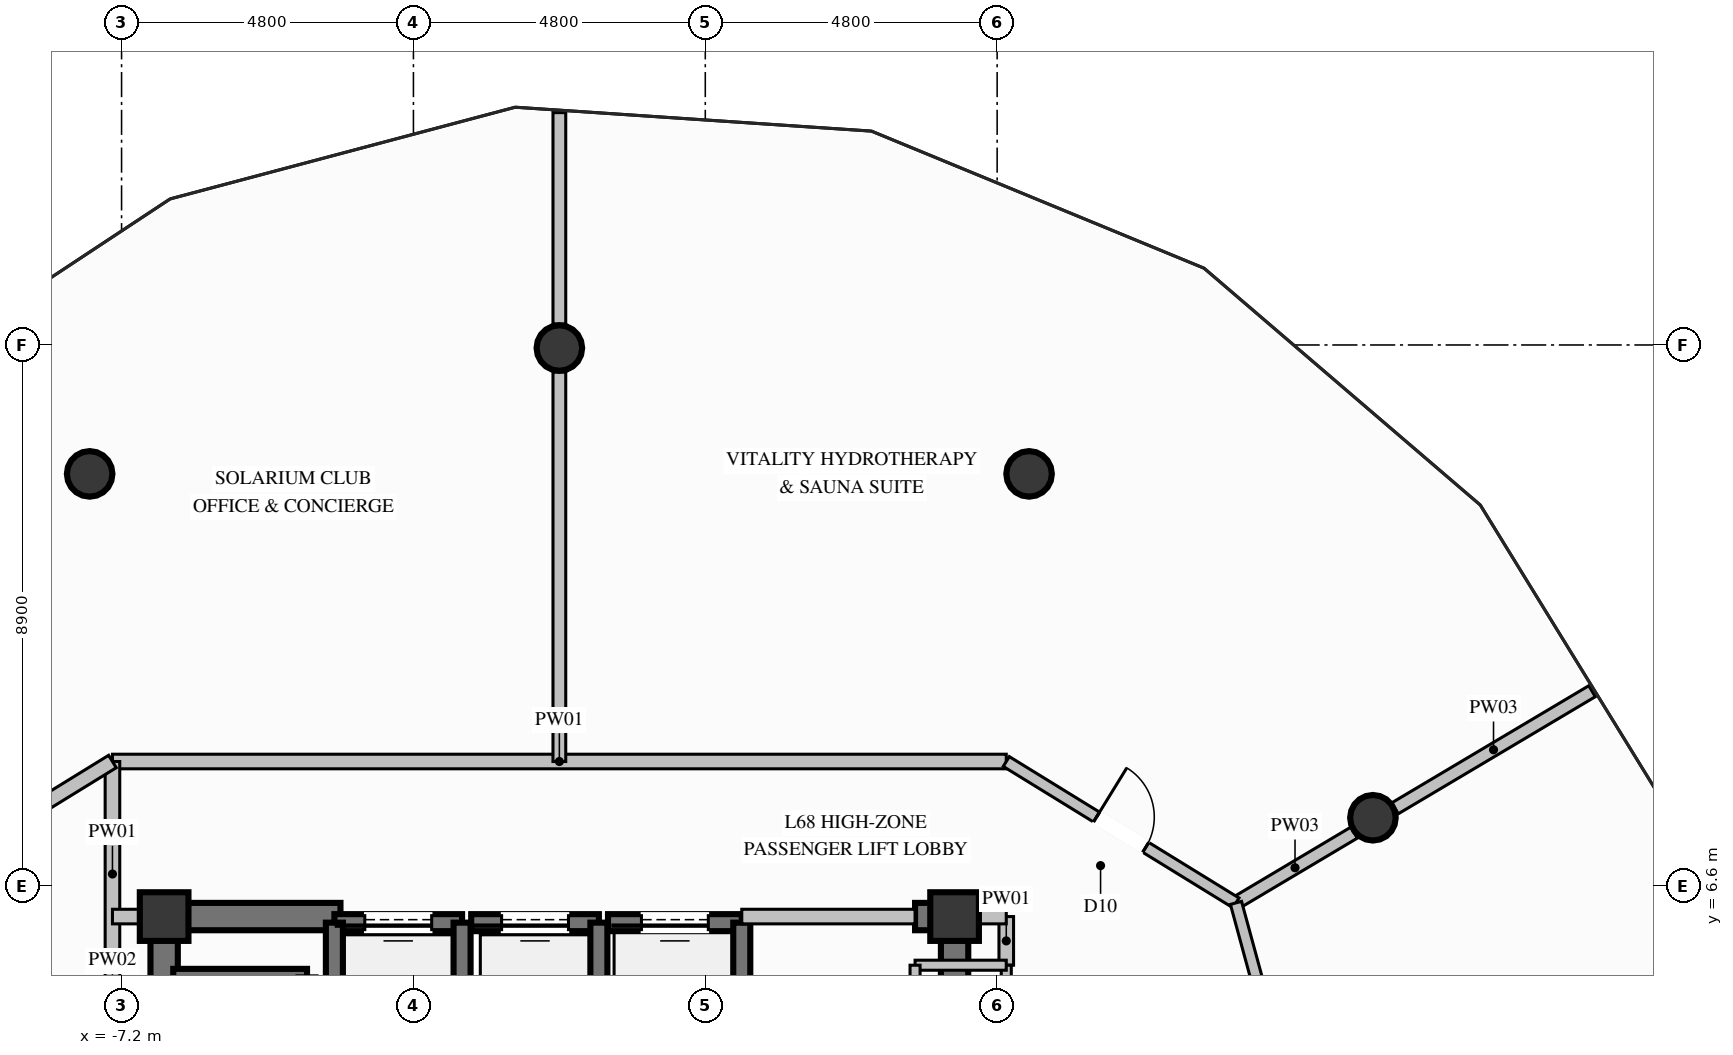
"""IFC4 building model, lengths in metres.
Left out: names, types, materials, properties, quantities, classifications, styles, units other than length and angle.
Written with IfcOpenShell. Run it as: python <this file> out.ifc"""

import sys

from ifc_helpers import new_model, si_unit, direction, frame, frame_2d, origin, origin_2d, place, context, subcontext, project, spatial, rectangle, circle, extrude, element, fill, save


model = new_model("IFC4")
c1 = context("Model", 3, precision=1e-05, world=origin(), true_north=direction((0.0, 1.0)))
c2 = subcontext(c1, "Body", "Model", "MODEL_VIEW")
j1 = project(units=[si_unit("LENGTHUNIT", "METRE"), si_unit("PLANEANGLEUNIT", "RADIAN")], contexts=[c1])
p1 = place(None, origin())
s1 = spatial("IfcSite", under=j1, at=p1, CompositionType="ELEMENT")
p2 = place(p1, origin())
s2 = spatial("IfcBuilding", under=s1, at=p2, CompositionType="ELEMENT")
p3 = place(p2, frame((0.0, 0.0, 262.0)))
s3 = spatial("IfcBuildingStorey", under=s2, at=p3, CompositionType="ELEMENT", Elevation=262.0)
for number, where, z_axis, x_axis in (
    (1, (6.5, 6.1, 0.0), (0.0, 0.0, 1.0), (1.0, 0.0, 0.0)),
    (2, (-6.5, 6.1, 0.0), (0.0, 0.0, 1.0), (1.0, 0.0, 0.0)),
):
    element("IfcColumn", number, at=place(p3, frame(where, z_axis=z_axis, x_axis=x_axis)), inside=s3, PredefinedType="COLUMN", context=c2, shape_type="SweptSolid", body=[
        extrude(rectangle(XDim=0.8, YDim=0.8, at=origin_2d()), origin(), (0.0, 0.0, 1.0), 4.8),
    ])
p4 = place(p3, frame((-6.275, 6.1, 0.0), z_axis=(0.0, 0.0, 1.0), x_axis=(1.0, 0.0, 0.0)))
e3 = element("IfcWall", 3, at=p4, inside=s3, PredefinedType="SHEAR", context=c2, shape_type="SweptSolid", body=[
    extrude(rectangle(XDim=2.675, YDim=0.45, at=frame_2d((1.337, 0.0))), origin(), (0.0, 0.0, 1.0), 4.8),
])
p5 = place(p3, frame((5.85, 6.1, 0.0), z_axis=(0.0, 0.0, 1.0), x_axis=(1.0, 0.0, 0.0)))
e4 = element("IfcWall", 4, at=p5, inside=s3, PredefinedType="SHEAR", context=c2, shape_type="SweptSolid", body=[
    extrude(rectangle(XDim=0.425, YDim=0.45, at=frame_2d((0.212, 0.0))), origin(), (0.0, 0.0, 1.0), 4.8),
])
p6 = place(p3, frame((-6.5, 2.35, 0.0), z_axis=(0.0, 0.0, 1.0), x_axis=(0.0, 1.0, 0.0)))
e5 = element("IfcWall", 5, at=p6, inside=s3, PredefinedType="SHEAR", context=c2, shape_type="SweptSolid", body=[
    extrude(rectangle(XDim=3.975, YDim=0.45, at=frame_2d((1.987, 0.0))), origin(), (0.0, 0.0, 1.0), 4.8),
])
p7 = place(p3, frame((6.5, 3.35, 0.0), z_axis=(0.0, 0.0, 1.0), x_axis=(0.0, 1.0, 0.0)))
e6 = element("IfcWall", 6, at=p7, inside=s3, PredefinedType="SHEAR", context=c2, shape_type="SweptSolid", body=[
    extrude(rectangle(XDim=2.975, YDim=0.45, at=frame_2d((1.487, 0.0))), origin(), (0.0, 0.0, 1.0), 4.8),
])
for number, where, z_axis, x_axis in (
    (7, (13.38, 7.725, 0.0), (0.0, 0.0, 1.0), (1.0, 0.0, 0.0)),
    (8, (7.725, 13.38, 0.0), (0.0, 0.0, 1.0), (1.0, 0.0, 0.0)),
    (9, (0.0, 15.45, 0.0), (0.0, 0.0, 1.0), (1.0, 0.0, 0.0)),
    (10, (-7.725, 13.38, 0.0), (0.0, 0.0, 1.0), (1.0, 0.0, 0.0)),
):
    element("IfcColumn", number, at=place(p3, frame(where, z_axis=z_axis, x_axis=x_axis)), inside=s3, PredefinedType="COLUMN", context=c2, shape_type="SweptSolid", body=[
        extrude(circle(Radius=0.375, at=origin_2d()), origin(), (0.0, 0.0, 1.0), 4.8),
    ])
p8 = place(p3, frame((-1.6, 6.0, 0.0), z_axis=(0.0, 0.0, 1.0), x_axis=(-1.0, 0.0, 0.0)))
e11 = element("IfcWall", 11, at=p8, inside=s3, PredefinedType="SOLIDWALL", context=c2, shape_type="SweptSolid", body=[
    extrude(rectangle(XDim=2.1, YDim=0.28, at=frame_2d((1.05, 0.0))), origin(), (0.0, 0.0, 1.0), 4.57),
])
p9 = place(p8, frame((0.5, 0.0, 0.0)))
e12 = element("IfcOpeningElement", 12, at=p9, cuts=e11, PredefinedType="OPENING", context=c2, shape_type="SweptSolid", body=[
    extrude(rectangle(XDim=1.1, YDim=2.2, at=frame_2d((0.55, 1.1))), frame((0.0, 0.15, 0.0), z_axis=(0.0, -1.0, 0.0), x_axis=(1.0, 0.0, 0.0)), (0.0, 0.0, 1.0), 0.3),
])
for number, where, z_axis, x_axis in (
    (13, (-3.7, 6.0, 0.0), (0.0, 0.0, 1.0), (0.0, -1.0, 0.0)),
    (14, (-1.6, 3.5, 0.0), (0.0, 0.0, 1.0), (0.0, 1.0, 0.0)),
):
    element("IfcWall", number, at=place(p3, frame(where, z_axis=z_axis, x_axis=x_axis)), inside=s3, PredefinedType="SOLIDWALL", context=c2, shape_type="SweptSolid", body=[
        extrude(rectangle(XDim=2.5, YDim=0.28, at=frame_2d((1.25, 0.0))), origin(), (0.0, 0.0, 1.0), 4.57),
    ])
p10 = place(p3, frame((0.65, 6.0, 0.0), z_axis=(0.0, 0.0, 1.0), x_axis=(-1.0, 0.0, 0.0)))
e15 = element("IfcWall", 15, at=p10, inside=s3, PredefinedType="SOLIDWALL", context=c2, shape_type="SweptSolid", body=[
    extrude(rectangle(XDim=2.1, YDim=0.28, at=frame_2d((1.05, 0.0))), origin(), (0.0, 0.0, 1.0), 4.57),
])
p11 = place(p10, frame((0.5, 0.0, 0.0)))
e16 = element("IfcOpeningElement", 16, at=p11, cuts=e15, PredefinedType="OPENING", context=c2, shape_type="SweptSolid", body=[
    extrude(rectangle(XDim=1.1, YDim=2.2, at=frame_2d((0.55, 1.1))), frame((0.0, 0.15, 0.0), z_axis=(0.0, -1.0, 0.0), x_axis=(1.0, 0.0, 0.0)), (0.0, 0.0, 1.0), 0.3),
])
p12 = place(p3, frame((0.65, 3.5, 0.0), z_axis=(0.0, 0.0, 1.0), x_axis=(0.0, 1.0, 0.0)))
e17 = element("IfcWall", 17, at=p12, inside=s3, PredefinedType="SOLIDWALL", context=c2, shape_type="SweptSolid", body=[
    extrude(rectangle(XDim=2.5, YDim=0.28, at=frame_2d((1.25, 0.0))), origin(), (0.0, 0.0, 1.0), 4.57),
])
p13 = place(p3, frame((3.0, 6.0, 0.0), z_axis=(0.0, 0.0, 1.0), x_axis=(-1.0, 0.0, 0.0)))
e18 = element("IfcWall", 18, at=p13, inside=s3, PredefinedType="SOLIDWALL", context=c2, shape_type="SweptSolid", body=[
    extrude(rectangle(XDim=2.2, YDim=0.28, at=frame_2d((1.1, 0.0))), origin(), (0.0, 0.0, 1.0), 4.57),
])
p14 = place(p13, frame((0.55, 0.0, 0.0)))
e19 = element("IfcOpeningElement", 19, at=p14, cuts=e18, PredefinedType="OPENING", context=c2, shape_type="SweptSolid", body=[
    extrude(rectangle(XDim=1.1, YDim=2.2, at=frame_2d((0.55, 1.1))), frame((0.0, 0.15, 0.0), z_axis=(0.0, -1.0, 0.0), x_axis=(1.0, 0.0, 0.0)), (0.0, 0.0, 1.0), 0.3),
])
p15 = place(p3, frame((3.0, 3.5, 0.0), z_axis=(0.0, 0.0, 1.0), x_axis=(0.0, 1.0, 0.0)))
e20 = element("IfcWall", 20, at=p15, inside=s3, PredefinedType="SOLIDWALL", context=c2, shape_type="SweptSolid", body=[
    extrude(rectangle(XDim=2.5, YDim=0.28, at=frame_2d((1.25, 0.0))), origin(), (0.0, 0.0, 1.0), 4.57),
])
p16 = place(p3, frame((-4.15, 5.1, 0.0), z_axis=(0.0, 0.0, 1.0), x_axis=(-1.0, 0.0, 0.0)))
e21 = element("IfcWall", 21, at=p16, inside=s3, PredefinedType="SOLIDWALL", context=c2, shape_type="SweptSolid", body=[
    extrude(rectangle(XDim=2.2, YDim=0.28, at=frame_2d((1.1, 0.0))), origin(), (0.0, 0.0, 1.0), 4.57),
])
p17 = place(p3, frame((-7.35, 8.65, 0.0), z_axis=(0.0, 0.0, 1.0), x_axis=(1.0, 0.0, 0.0)))
e22 = element("IfcWall", 22, at=p17, inside=s3, PredefinedType="PARTITIONING", context=c2, shape_type="SweptSolid", body=[
    extrude(rectangle(XDim=14.7, YDim=0.24, at=frame_2d((7.35, 0.0))), origin(), (0.0, 0.0, 1.0), 4.57),
])
p18 = place(p3, frame((3.0, 6.1, 0.0), z_axis=(0.0, 0.0, 1.0), x_axis=(1.0, 0.0, 0.0)))
e23 = element("IfcWall", 23, at=p18, inside=s3, PredefinedType="PARTITIONING", context=c2, shape_type="SweptSolid", body=[
    extrude(rectangle(XDim=2.85, YDim=0.24, at=frame_2d((1.425, 0.0))), origin(), (0.0, 0.0, 1.0), 3.455),
])
p19 = place(p3, frame((7.35, 5.3, 0.0), z_axis=(0.0, 0.0, 1.0), x_axis=(0.0, 1.0, 0.0)))
e24 = element("IfcWall", 24, at=p19, inside=s3, PredefinedType="PARTITIONING", context=c2, shape_type="SweptSolid", body=[
    extrude(rectangle(XDim=0.8, YDim=0.24, at=frame_2d((0.4, 0.0))), origin(), (0.0, 0.0, 1.0), 3.455),
])
p20 = place(p3, frame((6.5, 6.1, 0.0), z_axis=(0.0, 0.0, 1.0), x_axis=(1.0, 0.0, 0.0)))
e25 = element("IfcWall", 25, at=p20, inside=s3, PredefinedType="PARTITIONING", context=c2, shape_type="SweptSolid", body=[
    extrude(rectangle(XDim=0.85, YDim=0.24, at=frame_2d((0.425, 0.0))), origin(), (0.0, 0.0, 1.0), 4.011),
])
p21 = place(p3, frame((-7.35, 4.95, 0.0), z_axis=(0.0, 0.0, 1.0), x_axis=(0.0, 1.0, 0.0)))
e26 = element("IfcWall", 26, at=p21, inside=s3, PredefinedType="PARTITIONING", context=c2, shape_type="SweptSolid", body=[
    extrude(rectangle(XDim=3.7, YDim=0.24, at=frame_2d((1.85, 0.0))), origin(), (0.0, 0.0, 1.0), 3.455),
])
p22 = place(p3, frame((-7.35, 6.1, 0.0), z_axis=(0.0, 0.0, 1.0), x_axis=(1.0, 0.0, 0.0)))
e27 = element("IfcWall", 27, at=p22, inside=s3, PredefinedType="PARTITIONING", context=c2, shape_type="SweptSolid", body=[
    extrude(rectangle(XDim=0.85, YDim=0.24, at=frame_2d((0.425, 0.0))), origin(), (0.0, 0.0, 1.0), 4.011),
])
p23 = place(p3, frame((7.35, 2.75, 0.0), z_axis=(0.0, 0.0, 1.0), x_axis=(0.0, 1.0, 0.0)))
e28 = element("IfcWall", 28, at=p23, inside=s3, PredefinedType="PARTITIONING", context=c2, shape_type="SweptSolid", body=[
    extrude(rectangle(XDim=2.55, YDim=0.165, at=frame_2d((1.275, 0.0))), origin(), (0.0, 0.0, 1.0), 3.455),
])
p24 = place(p23, frame((0.8, 0.0, 0.0)))
e29 = element("IfcOpeningElement", 29, at=p24, cuts=e28, PredefinedType="OPENING", context=c2, shape_type="SweptSolid", body=[
    extrude(rectangle(XDim=0.95, YDim=2.1, at=frame_2d((0.475, 1.05))), frame((0.0, 0.093, 0.0), z_axis=(0.0, -1.0, 0.0), x_axis=(1.0, 0.0, 0.0)), (0.0, 0.0, 1.0), 0.185),
])
p25 = place(p3, frame((7.35, 5.3, 0.0), z_axis=(0.0, 0.0, 1.0), x_axis=(-1.0, 0.0, 0.0)))
e30 = element("IfcWall", 30, at=p25, inside=s3, PredefinedType="PARTITIONING", context=c2, shape_type="SweptSolid", body=[
    extrude(rectangle(XDim=1.5, YDim=0.165, at=frame_2d((0.75, 0.0))), origin(), (0.0, 0.0, 1.0), 3.455),
])
p26 = place(p3, frame((5.85, 5.3, 0.0), z_axis=(0.0, 0.0, 1.0), x_axis=(0.0, -1.0, 0.0)))
e31 = element("IfcWall", 31, at=p26, inside=s3, PredefinedType="PARTITIONING", context=c2, shape_type="SweptSolid", body=[
    extrude(rectangle(XDim=2.55, YDim=0.165, at=frame_2d((1.275, 0.0))), origin(), (0.0, 0.0, 1.0), 3.455),
])
p27 = place(p3, frame((11.128, 6.325, 0.0), z_axis=(0.0, 0.0, 1.0), x_axis=(0.859488422008, 0.511155213642, 0.0)))
e32 = element("IfcWall", 32, at=p27, inside=s3, PredefinedType="PARTITIONING", context=c2, shape_type="SweptSolid", body=[
    extrude(rectangle(XDim=2.26, YDim=0.21, at=frame_2d((1.13, 0.0))), origin(), (0.0, 0.0, 1.0), 4.011),
])
p28 = place(p3, frame((13.743, 7.88, 0.0), z_axis=(0.0, 0.0, 1.0), x_axis=(0.859656572413, 0.510872369097, 0.0)))
e33 = element("IfcWall", 33, at=p28, inside=s3, PredefinedType="PARTITIONING", context=c2, shape_type="SweptSolid", body=[
    extrude(rectangle(XDim=3.77, YDim=0.21, at=frame_2d((1.885, 0.0))), origin(), (0.0, 0.0, 1.0), 4.57),
])
p29 = place(p3, frame((7.35, 8.65, 0.0), z_axis=(0.0, 0.0, 1.0), x_axis=(0.851645088617, -0.524118920699, 0.0)))
e34 = element("IfcWall", 34, at=p29, inside=s3, PredefinedType="PARTITIONING", context=c2, shape_type="SweptSolid", body=[
    extrude(rectangle(XDim=4.436, YDim=0.19, at=frame_2d((2.218, 0.0))), origin(), (0.0, 0.0, 1.0), 4.57),
])
p30 = place(p29, frame((1.743, 0.0, 0.0)))
e35 = element("IfcOpeningElement", 35, at=p30, cuts=e34, PredefinedType="OPENING", context=c2, shape_type="SweptSolid", body=[
    extrude(rectangle(XDim=0.95, YDim=2.1, at=frame_2d((0.475, 1.05))), frame((0.0, 0.105, 0.0), z_axis=(0.0, -1.0, 0.0), x_axis=(1.0, 0.0, 0.0)), (0.0, 0.0, 1.0), 0.21),
])
p31 = place(p3, frame((0.0, 8.65, 0.0), z_axis=(0.0, 0.0, 1.0), x_axis=(0.0, 1.0, 0.0)))
e36 = element("IfcWall", 36, at=p31, inside=s3, PredefinedType="PARTITIONING", context=c2, shape_type="SweptSolid", body=[
    extrude(rectangle(XDim=6.405, YDim=0.21, at=frame_2d((3.203, 0.0))), origin(), (0.0, 0.0, 1.0), 4.57),
])
p32 = place(p3, frame((0.0, 15.845, 0.0), z_axis=(0.0, 0.0, 1.0), x_axis=(0.0, 1.0, 0.0)))
e37 = element("IfcWall", 37, at=p32, inside=s3, PredefinedType="PARTITIONING", context=c2, shape_type="SweptSolid", body=[
    extrude(rectangle(XDim=3.476, YDim=0.21, at=frame_2d((1.738, 0.0))), origin(), (0.0, 0.0, 1.0), 4.57),
])
p33 = place(p3, frame((-11.128, 6.325, 0.0), z_axis=(0.0, 0.0, 1.0), x_axis=(0.851645088617, 0.524118920699, 0.0)))
e38 = element("IfcWall", 38, at=p33, inside=s3, PredefinedType="PARTITIONING", context=c2, shape_type="SweptSolid", body=[
    extrude(rectangle(XDim=4.436, YDim=0.24, at=frame_2d((2.218, 0.0))), origin(), (0.0, 0.0, 1.0), 4.57),
])
p34 = place(p33, frame((1.743, 0.0, 0.0)))
e39 = element("IfcOpeningElement", 39, at=p34, cuts=e38, PredefinedType="OPENING", context=c2, shape_type="SweptSolid", body=[
    extrude(rectangle(XDim=0.95, YDim=2.1, at=frame_2d((0.475, 1.05))), frame((0.0, 0.13, 0.0), z_axis=(0.0, -1.0, 0.0), x_axis=(1.0, 0.0, 0.0)), (0.0, 0.0, 1.0), 0.26),
])
p35 = place(p3, frame((12.85, 0.0, 0.0), z_axis=(0.0, 0.0, 1.0), x_axis=(-0.262717156474, 0.964872890952, 0.0)))
e40 = element("IfcWall", 40, at=p35, inside=s3, PredefinedType="PARTITIONING", context=c2, shape_type="SweptSolid", body=[
    extrude(rectangle(XDim=6.555, YDim=0.19, at=frame_2d((3.278, 0.0))), origin(), (0.0, 0.0, 1.0), 4.57),
])
p36 = place(p9, origin())
e41 = element("IfcDoor", 41, at=p36, inside=s3, OperationType="SLIDING_TO_LEFT", PredefinedType="DOOR", context=c2, shape_type="SweptSolid", body=[
    extrude(rectangle(XDim=1.1, YDim=2.2, at=frame_2d((0.55, 1.1))), frame((0.0, 0.025, 0.0), z_axis=(0.0, -1.0, 0.0), x_axis=(1.0, 0.0, 0.0)), (0.0, 0.0, 1.0), 0.05),
])
fill(e12, e41)
p37 = place(p11, origin())
e42 = element("IfcDoor", 42, at=p37, inside=s3, OperationType="SLIDING_TO_LEFT", PredefinedType="DOOR", context=c2, shape_type="SweptSolid", body=[
    extrude(rectangle(XDim=1.1, YDim=2.2, at=frame_2d((0.55, 1.1))), frame((0.0, 0.025, 0.0), z_axis=(0.0, -1.0, 0.0), x_axis=(1.0, 0.0, 0.0)), (0.0, 0.0, 1.0), 0.05),
])
fill(e16, e42)
p38 = place(p14, origin())
e43 = element("IfcDoor", 43, at=p38, inside=s3, OperationType="SLIDING_TO_LEFT", PredefinedType="DOOR", context=c2, shape_type="SweptSolid", body=[
    extrude(rectangle(XDim=1.1, YDim=2.2, at=frame_2d((0.55, 1.1))), frame((0.0, 0.025, 0.0), z_axis=(0.0, -1.0, 0.0), x_axis=(1.0, 0.0, 0.0)), (0.0, 0.0, 1.0), 0.05),
])
fill(e19, e43)
p39 = place(p30, origin())
e44 = element("IfcDoor", 44, at=p39, inside=s3, OperationType="SINGLE_SWING_LEFT", PredefinedType="DOOR", context=c2, shape_type="SweptSolid", body=[
    extrude(rectangle(XDim=0.95, YDim=2.1, at=frame_2d((0.475, 1.05))), frame((0.0, 0.025, 0.0), z_axis=(0.0, -1.0, 0.0), x_axis=(1.0, 0.0, 0.0)), (0.0, 0.0, 1.0), 0.05),
])
fill(e35, e44)
save(model, sys.argv[1])
